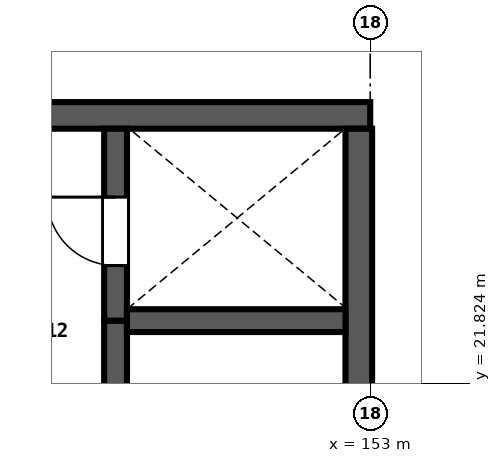
"""IFC4 building model, lengths in metres.
Left out: names, types, materials, properties, quantities, classifications, styles, units other than length and angle.
Written with IfcOpenShell. Run it as: python <this file> out.ifc"""

import sys

from ifc_helpers import new_model, si_unit, direction, frame, frame_2d, origin, place, context, subcontext, project, spatial, rectangle, extrude, element, fill, save


model = new_model("IFC4")
c1 = context("Model", 3, precision=1e-05, world=origin(), true_north=direction((0.0, 1.0)))
c2 = subcontext(c1, "Body", "Model", "MODEL_VIEW")
j1 = project(units=[si_unit("LENGTHUNIT", "METRE"), si_unit("PLANEANGLEUNIT", "RADIAN")], contexts=[c1])
p1 = place(None, origin())
s1 = spatial("IfcSite", under=j1, at=p1, CompositionType="ELEMENT")
p2 = place(p1, origin())
s2 = spatial("IfcBuilding", under=s1, at=p2, CompositionType="ELEMENT")
p3 = place(p2, frame((0.0, 0.0, 4.8)))
s3 = spatial("IfcBuildingStorey", under=s2, at=p3, CompositionType="ELEMENT", Elevation=4.8)
p4 = place(p3, frame((153.0, 25.35, 0.0), z_axis=(0.0, 0.0, 1.0), x_axis=(-1.0, 0.0, 0.0)))
e1 = element("IfcWall", 1, at=p4, inside=s3, PredefinedType="SHEAR", context=c2, shape_type="SweptSolid", body=[
    extrude(rectangle(XDim=18.0, YDim=0.35, at=frame_2d((9.0, 0.0))), origin(), (0.0, 0.0, 1.0), 4.52),
])
p5 = place(p3, frame((152.85, 19.825, 0.0), z_axis=(0.0, 0.0, 1.0), x_axis=(0.0, 1.0, 0.0)))
e2 = element("IfcWall", 2, at=p5, inside=s3, PredefinedType="SHEAR", context=c2, shape_type="SweptSolid", body=[
    extrude(rectangle(XDim=5.35, YDim=0.35, at=frame_2d((2.675, 0.0))), origin(), (0.0, 0.0, 1.0), 4.52),
])
p6 = place(p3, frame((149.65, 19.825, 0.0), z_axis=(0.0, 0.0, 1.0), x_axis=(0.0, 1.0, 0.0)))
e3 = element("IfcWall", 3, at=p6, inside=s3, PredefinedType="SHEAR", context=c2, shape_type="SweptSolid", body=[
    extrude(rectangle(XDim=2.825, YDim=0.3, at=frame_2d((1.413, 0.0))), origin(), (0.0, 0.0, 1.0), 4.52),
])
p7 = place(p3, frame((149.65, 22.65, 0.0), z_axis=(0.0, 0.0, 1.0), x_axis=(0.0, 1.0, 0.0)))
e4 = element("IfcWall", 4, at=p7, inside=s3, PredefinedType="SHEAR", context=c2, shape_type="SweptSolid", body=[
    extrude(rectangle(XDim=2.525, YDim=0.3, at=frame_2d((1.263, 0.0))), origin(), (0.0, 0.0, 1.0), 4.52),
])
p8 = place(p7, frame((0.725, 0.0, 0.0)))
e5 = element("IfcOpeningElement", 5, at=p8, cuts=e4, PredefinedType="OPENING", context=c2, shape_type="SweptSolid", body=[
    extrude(rectangle(XDim=0.9, YDim=2.1, at=frame_2d((0.45, 1.05))), frame((0.0, 0.16, 0.0), z_axis=(0.0, -1.0, 0.0), x_axis=(1.0, 0.0, 0.0)), (0.0, 0.0, 1.0), 0.32),
])
p9 = place(p3, frame((149.8, 22.65, 0.0), z_axis=(0.0, 0.0, 1.0), x_axis=(1.0, 0.0, 0.0)))
e6 = element("IfcWall", 6, at=p9, inside=s3, PredefinedType="SHEAR", context=c2, shape_type="SweptSolid", body=[
    extrude(rectangle(XDim=2.875, YDim=0.3, at=frame_2d((1.438, 0.0))), origin(), (0.0, 0.0, 1.0), 4.52),
])
p10 = place(p8, origin())
e7 = element("IfcDoor", 7, at=p10, inside=s3, OperationType="SINGLE_SWING_RIGHT", PredefinedType="DOOR", context=c2, shape_type="SweptSolid", body=[
    extrude(rectangle(XDim=0.9, YDim=2.1, at=frame_2d((0.45, 1.05))), frame((0.0, 0.025, 0.0), z_axis=(0.0, -1.0, 0.0), x_axis=(1.0, 0.0, 0.0)), (0.0, 0.0, 1.0), 0.05),
])
fill(e5, e7)
save(model, sys.argv[1])
